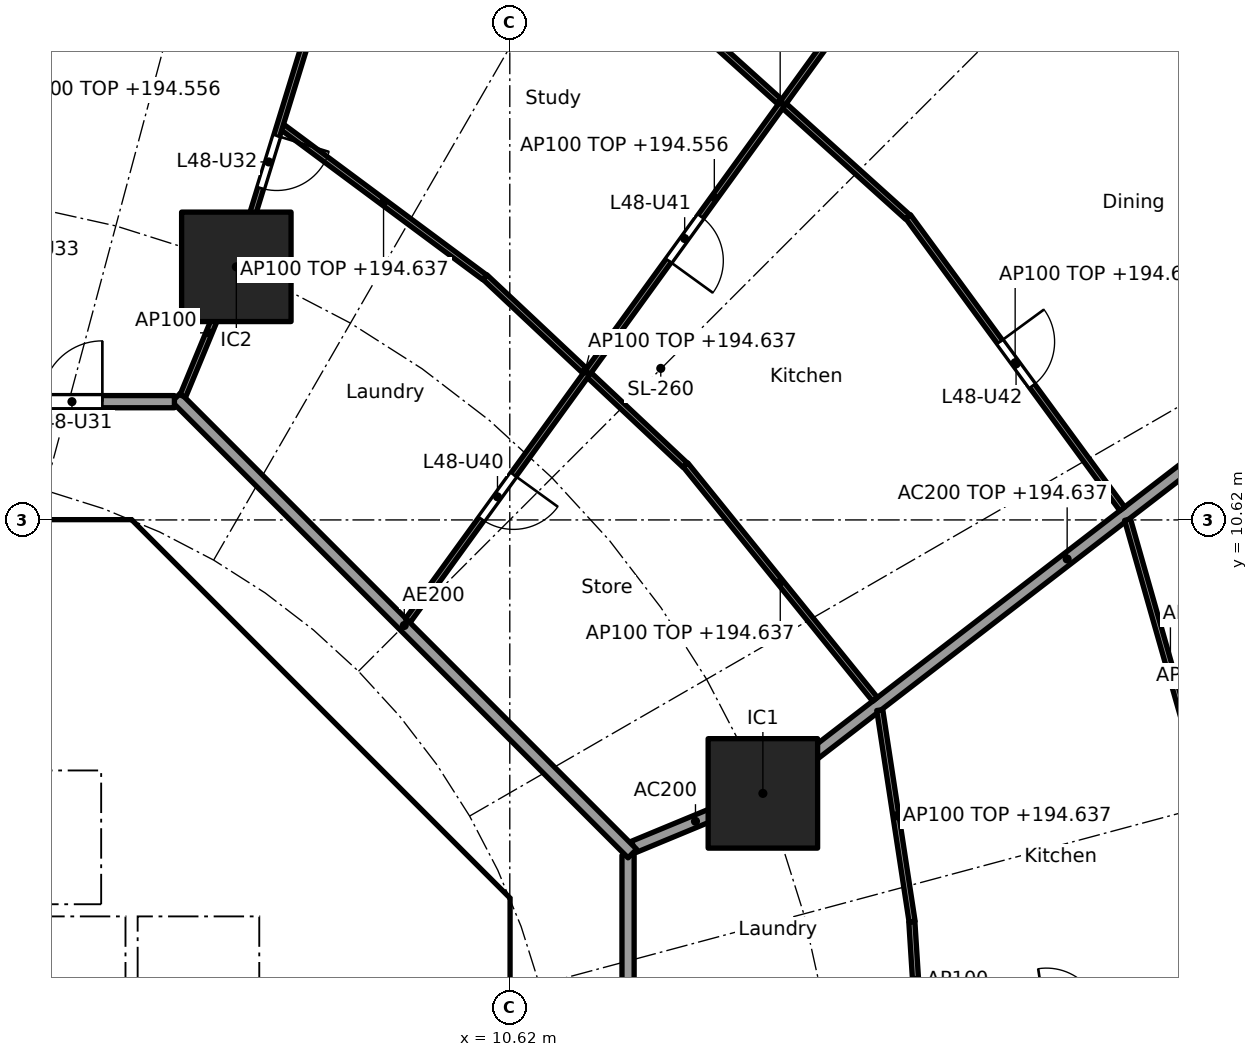
"""IFC4 building model, lengths in metres.
Left out: names, types, materials, properties, quantities, classifications, styles, units other than length and angle.
Written with IfcOpenShell. Run it as: python <this file> out.ifc"""

import sys

from ifc_helpers import new_model, si_unit, direction, frame, frame_2d, origin, origin_2d, place, context, subcontext, project, spatial, polyline, rectangle, outline, extrude, element, fill, save


model = new_model("IFC4")
c1 = context("Model", 3, precision=1e-05, world=origin(), true_north=direction((0.0, 1.0)))
c2 = subcontext(c1, "Body", "Model", "MODEL_VIEW")
j1 = project(units=[si_unit("LENGTHUNIT", "METRE"), si_unit("PLANEANGLEUNIT", "RADIAN")], contexts=[c1])
p1 = place(None, origin())
s1 = spatial("IfcSite", under=j1, at=p1, CompositionType="ELEMENT")
p2 = place(p1, origin())
s2 = spatial("IfcBuilding", under=s1, at=p2, CompositionType="ELEMENT")
p3 = place(p2, frame((0.0, 0.0, 191.8)))
s3 = spatial("IfcBuildingStorey", under=s2, at=p3, CompositionType="ELEMENT", Elevation=191.8)
for number, where, z_axis, x_axis in (
    (1, (14.782, 6.123, 0.0), (0.0, 0.0, 1.0), (1.0, 0.0, 0.0)),
    (2, (6.123, 14.782, 0.0), (0.0, 0.0, 1.0), (1.0, 0.0, 0.0)),
):
    element("IfcColumn", number, at=place(p3, frame(where, z_axis=z_axis, x_axis=x_axis)), inside=s3, PredefinedType="COLUMN", context=c2, shape_type="SweptSolid", body=[
        extrude(rectangle(XDim=1.8, YDim=1.8, at=origin_2d()), origin(), (0.0, 0.0, 1.0), 3.7),
    ])
p4 = place(p3, frame((9.988, 4.613, 0.0), z_axis=(0.0, 0.0, 1.0), x_axis=(-0.707106781187, 0.707106781187, 0.0)))
e3 = element("IfcWall", 3, at=p4, inside=s3, PredefinedType="SHEAR", context=c2, shape_type="SweptSolid", body=[
    extrude(rectangle(XDim=7.602, YDim=0.6, at=frame_2d((3.801, 0.0))), origin(), (0.0, 0.0, 1.0), 3.44),
])
p5 = place(p4, frame((3.201, 0.0, 0.0)))
e4 = element("IfcOpeningElement", 4, at=p5, cuts=e3, PredefinedType="OPENING", context=c2, shape_type="SweptSolid", body=[
    extrude(rectangle(XDim=1.2, YDim=2.1, at=frame_2d((0.6, 1.05))), frame((0.0, 0.31, 0.0), z_axis=(0.0, -1.0, 0.0), x_axis=(1.0, 0.0, 0.0)), (0.0, 0.0, 1.0), 0.62),
])
p6 = place(p3, frame((4.0, 4.3, 0.0), z_axis=(0.0, 0.0, 1.0), x_axis=(0.0, 1.0, 0.0)))
e5 = element("IfcWall", 5, at=p6, inside=s3, PredefinedType="SOLIDWALL", context=c2, shape_type="SweptSolid", body=[
    extrude(rectangle(XDim=2.2, YDim=0.2, at=frame_2d((1.1, 0.0))), origin(), (0.0, 0.0, 1.0), 3.44),
])
p7 = place(p6, frame((0.55, 0.0, 0.0)))
e6 = element("IfcOpeningElement", 6, at=p7, cuts=e5, PredefinedType="OPENING", context=c2, shape_type="SweptSolid", body=[
    extrude(rectangle(XDim=1.1, YDim=2.1, at=frame_2d((0.55, 1.05))), frame((0.0, 0.11, 0.0), z_axis=(0.0, -1.0, 0.0), x_axis=(1.0, 0.0, 0.0)), (0.0, 0.0, 1.0), 0.22),
])
p8 = place(p3, frame((6.7, 4.0, 0.0), z_axis=(0.0, 0.0, 1.0), x_axis=(1.0, 0.0, 0.0)))
e7 = element("IfcWall", 7, at=p8, inside=s3, PredefinedType="SOLIDWALL", context=c2, shape_type="SweptSolid", body=[
    extrude(rectangle(XDim=3.325, YDim=0.2, at=frame_2d((1.662, 0.0))), origin(), (0.0, 0.0, 1.0), 3.44),
])
p9 = place(p8, frame((1.25, 0.0, 0.0)))
e8 = element("IfcOpeningElement", 8, at=p9, cuts=e7, PredefinedType="OPENING", context=c2, shape_type="SweptSolid", body=[
    extrude(rectangle(XDim=1.1, YDim=2.1, at=frame_2d((0.55, 1.05))), frame((0.0, 0.11, 0.0), z_axis=(0.0, -1.0, 0.0), x_axis=(1.0, 0.0, 0.0)), (0.0, 0.0, 1.0), 0.22),
])
p10 = place(p3, frame((4.0, 7.025, 0.0), z_axis=(0.0, 0.0, 1.0), x_axis=(0.0, 1.0, 0.0)))
e9 = element("IfcWall", 9, at=p10, inside=s3, PredefinedType="SOLIDWALL", context=c2, shape_type="SweptSolid", body=[
    extrude(rectangle(XDim=3.0, YDim=0.2, at=frame_2d((1.5, 0.0))), origin(), (0.0, 0.0, 1.0), 3.44),
])
p11 = place(p10, frame((0.925, 0.0, 0.0)))
e10 = element("IfcOpeningElement", 10, at=p11, cuts=e9, PredefinedType="OPENING", context=c2, shape_type="SweptSolid", body=[
    extrude(rectangle(XDim=1.1, YDim=2.1, at=frame_2d((0.55, 1.05))), frame((0.0, 0.11, 0.0), z_axis=(0.0, -1.0, 0.0), x_axis=(1.0, 0.0, 0.0)), (0.0, 0.0, 1.0), 0.22),
])
p12 = place(p3, origin())
e11 = element("IfcWall", 11, at=p12, inside=s3, PredefinedType="SHEAR", context=c2, shape_type="SweptSolid", body=[
    extrude(outline(polyline([(-4.152, 10.025), (-4.401, 9.776), (-4.825, 10.2), (-4.401, 10.625), (4.401, 10.625), (4.825, 10.2), (4.401, 9.776), (4.152, 10.025), (-4.152, 10.025)])), origin(), (0.0, 0.0, 1.0), 3.44),
])
p13 = place(p3, origin())
e12 = element("IfcWall", 12, at=p13, inside=s3, PredefinedType="SHEAR", context=c2, shape_type="SweptSolid", body=[
    extrude(outline(polyline([(9.776, -4.401), (10.025, -4.152), (10.025, -3.801), (10.025, 4.152), (9.776, 4.401), (10.2, 4.825), (10.625, 4.401), (10.625, -4.401), (10.2, -4.825), (9.776, -4.401)])), origin(), (0.0, 0.0, 1.0), 3.44),
])
p14 = place(p3, origin())
e13 = element("IfcWall", 13, at=p14, inside=s3, PredefinedType="SOLIDWALL", context=c2, shape_type="SweptSolid", body=[
    extrude(outline(polyline([(-6.7, 4.3), (6.7, 4.3), (6.7, 2.1), (6.5, 2.1), (6.5, 4.1), (4.5, 4.1), (4.5, 2.1), (4.3, 2.1), (4.3, 4.1), (2.3, 4.1), (2.3, 2.1), (2.1, 2.1), (2.1, 4.1), (0.1, 4.1), (0.1, 2.1), (-0.1, 2.1), (-0.1, 4.1), (-2.1, 4.1), (-2.1, 2.1), (-2.3, 2.1), (-2.3, 4.1), (-6.5, 4.1), (-6.5, 2.1), (-6.7, 2.1), (-6.7, 4.3)])), origin(), (0.0, 0.0, 1.0), 3.44),
])
p15 = place(p3, origin())
e14 = element("IfcWall", 14, at=p15, inside=s3, PredefinedType="SOLIDWALL", context=c2, shape_type="SweptSolid", body=[
    extrude(outline(polyline([(4.1, 6.5), (-4.1, 6.5), (-4.1, 7.025), (4.1, 7.025), (4.1, 6.5)])), origin(), (0.0, 0.0, 1.0), 3.44),
])
p16 = place(p3, origin())
e15 = element("IfcWall", 15, at=p16, inside=s3, PredefinedType="SOLIDWALL", context=c2, shape_type="SweptSolid", body=[
    extrude(outline(polyline([(7.025, -3.9), (6.7, -3.9), (6.7, 3.9), (7.025, 3.9), (7.025, -3.9)])), origin(), (0.0, 0.0, 1.0), 3.44),
])
p17 = place(p3, frame((12.657, 5.243, 0.0), z_axis=(0.0, 0.0, 1.0), x_axis=(0.92383017907, 0.382802560388, 0.0)))
e16 = element("IfcWall", 16, at=p17, inside=s3, PredefinedType="PARTITIONING", context=c2, shape_type="SweptSolid", body=[
    extrude(rectangle(XDim=2.2, YDim=0.2, at=frame_2d((1.1, 0.0))), origin(), (0.0, 0.0, 1.0), 3.44),
])
p18 = place(p3, frame((14.822, 6.154, 0.0), z_axis=(0.0, 0.0, 1.0), x_axis=(0.792203056092, 0.610257583254, 0.0)))
e17 = element("IfcWall", 17, at=p18, inside=s3, PredefinedType="PARTITIONING", context=c2, shape_type="SweptSolid", body=[
    extrude(rectangle(XDim=12.533, YDim=0.2, at=frame_2d((6.266, 0.0))), origin(), (0.0, 0.0, 1.0), 2.837),
])
p19 = place(p3, frame((12.565, -5.104, 0.0), z_axis=(0.0, 0.0, 1.0), x_axis=(0.0, 1.0, 0.0)))
e18 = element("IfcWall", 18, at=p19, inside=s3, PredefinedType="PARTITIONING", context=c2, shape_type="SweptSolid", body=[
    extrude(rectangle(XDim=10.209, YDim=0.2, at=frame_2d((5.104, 0.0))), origin(), (0.0, 0.0, 1.0), 3.44),
])
p20 = place(p19, frame((4.604, 0.0, 0.0)))
e19 = element("IfcOpeningElement", 19, at=p20, cuts=e18, PredefinedType="OPENING", context=c2, shape_type="SweptSolid", body=[
    extrude(rectangle(XDim=1.0, YDim=2.1, at=frame_2d((0.5, 1.05))), frame((0.0, 0.11, 0.0), z_axis=(0.0, -1.0, 0.0), x_axis=(1.0, 0.0, 0.0)), (0.0, 0.0, 1.0), 0.22),
])
p21 = place(p3, frame((12.635, 5.134, 0.0), z_axis=(0.0, 0.0, 1.0), x_axis=(-0.707106781187, 0.707106781187, 0.0)))
e20 = element("IfcWall", 20, at=p21, inside=s3, PredefinedType="PARTITIONING", context=c2, shape_type="SweptSolid", body=[
    extrude(rectangle(XDim=10.609, YDim=0.2, at=frame_2d((5.305, 0.0))), origin(), (0.0, 0.0, 1.0), 3.44),
])
p22 = place(p3, frame((5.104, 12.565, 0.0), z_axis=(0.0, 0.0, 1.0), x_axis=(-1.0, 0.0, 0.0)))
e21 = element("IfcWall", 21, at=p22, inside=s3, PredefinedType="PARTITIONING", context=c2, shape_type="SweptSolid", body=[
    extrude(rectangle(XDim=10.409, YDim=0.2, at=frame_2d((5.205, 0.0))), origin(), (0.0, 0.0, 1.0), 3.44),
])
p23 = place(p22, frame((1.185, 0.0, 0.0)))
e22 = element("IfcOpeningElement", 22, at=p23, cuts=e21, PredefinedType="OPENING", context=c2, shape_type="SweptSolid", body=[
    extrude(rectangle(XDim=1.0, YDim=2.1, at=frame_2d((0.5, 1.05))), frame((0.0, 0.11, 0.0), z_axis=(0.0, -1.0, 0.0), x_axis=(1.0, 0.0, 0.0)), (0.0, 0.0, 1.0), 0.22),
])
p24 = place(p3, frame((17.355, 2.082, 0.0), z_axis=(0.0, 0.0, 1.0), x_axis=(-0.063689464349, 0.997969765139, 0.0)))
e23 = element("IfcWall", 23, at=p24, inside=s3, PredefinedType="PARTITIONING", context=c2, shape_type="SweptSolid", body=[
    extrude(rectangle(XDim=1.936, YDim=0.1, at=frame_2d((0.968, 0.0))), origin(), (0.0, 0.0, 1.0), 3.44),
])
p25 = place(p3, frame((17.236, 4.014, 0.0), z_axis=(0.0, 0.0, 1.0), x_axis=(-0.151087537093, 0.988520387314, 0.0)))
e24 = element("IfcWall", 24, at=p25, inside=s3, PredefinedType="PARTITIONING", context=c2, shape_type="SweptSolid", body=[
    extrude(rectangle(XDim=3.519, YDim=0.1, at=frame_2d((1.76, 0.0))), origin(), (0.0, 0.0, 1.0), 2.837),
])
p26 = place(p3, frame((22.189, 5.67, 0.0), z_axis=(0.0, 0.0, 1.0), x_axis=(-0.273819702124, 0.961781040949, 0.0)))
e25 = element("IfcWall", 25, at=p26, inside=s3, PredefinedType="PARTITIONING", context=c2, shape_type="SweptSolid", body=[
    extrude(rectangle(XDim=5.152, YDim=0.1, at=frame_2d((2.576, 0.0))), origin(), (0.0, 0.0, 1.0), 2.837),
])
p27 = place(p3, frame((16.626, 7.67, 0.0), z_axis=(0.0, 0.0, 1.0), x_axis=(-0.628764602857, 0.777595700987, 0.0)))
e26 = element("IfcWall", 26, at=p27, inside=s3, PredefinedType="PARTITIONING", context=c2, shape_type="SweptSolid", body=[
    extrude(rectangle(XDim=4.957, YDim=0.1, at=frame_2d((2.479, 0.0))), origin(), (0.0, 0.0, 1.0), 2.837),
])
p28 = place(p3, frame((20.692, 10.802, 0.0), z_axis=(0.0, 0.0, 1.0), x_axis=(-0.591122127251, 0.806582066918, 0.0)))
e27 = element("IfcWall", 27, at=p28, inside=s3, PredefinedType="PARTITIONING", context=c2, shape_type="SweptSolid", body=[
    extrude(rectangle(XDim=5.96, YDim=0.1, at=frame_2d((2.98, 0.0))), origin(), (0.0, 0.0, 1.0), 2.837),
])
p29 = place(p28, frame((2.505, 0.0, 0.0)))
e28 = element("IfcOpeningElement", 28, at=p29, cuts=e27, PredefinedType="OPENING", context=c2, shape_type="SweptSolid", body=[
    extrude(rectangle(XDim=0.9, YDim=2.1, at=frame_2d((0.45, 1.05))), frame((0.0, 0.06, 0.0), z_axis=(0.0, -1.0, 0.0), x_axis=(1.0, 0.0, 0.0)), (0.0, 0.0, 1.0), 0.12),
])
p30 = place(p3, frame((13.504, 11.52, 0.0), z_axis=(0.0, 0.0, 1.0), x_axis=(-0.728883199496, 0.684638066055, 0.0)))
e29 = element("IfcWall", 29, at=p30, inside=s3, PredefinedType="PARTITIONING", context=c2, shape_type="SweptSolid", body=[
    extrude(rectangle(XDim=4.519, YDim=0.1, at=frame_2d((2.26, 0.0))), origin(), (0.0, 0.0, 1.0), 2.837),
])
p31 = place(p3, frame((17.162, 15.603, 0.0), z_axis=(0.0, 0.0, 1.0), x_axis=(-0.742768881471, 0.669547898748, 0.0)))
e30 = element("IfcWall", 30, at=p31, inside=s3, PredefinedType="PARTITIONING", context=c2, shape_type="SweptSolid", body=[
    extrude(rectangle(XDim=5.642, YDim=0.1, at=frame_2d((2.821, 0.0))), origin(), (0.0, 0.0, 1.0), 2.837),
])
p32 = place(p3, frame((8.943, 8.966, 0.0), z_axis=(0.0, 0.0, 1.0), x_axis=(0.586803608919, 0.809729290912, 0.0)))
e31 = element("IfcWall", 31, at=p32, inside=s3, PredefinedType="PARTITIONING", context=c2, shape_type="SweptSolid", body=[
    extrude(rectangle(XDim=17.179, YDim=0.1, at=frame_2d((8.589, 0.0))), origin(), (0.0, 0.0, 1.0), 2.756),
])
p33 = place(p32, frame((2.062, 0.0, 0.0)))
e32 = element("IfcOpeningElement", 32, at=p33, cuts=e31, PredefinedType="OPENING", context=c2, shape_type="SweptSolid", body=[
    extrude(rectangle(XDim=0.9, YDim=2.1, at=frame_2d((0.45, 1.05))), frame((0.0, 0.06, 0.0), z_axis=(0.0, -1.0, 0.0), x_axis=(1.0, 0.0, 0.0)), (0.0, 0.0, 1.0), 0.12),
])
p34 = place(p32, frame((7.308, 0.0, 0.0)))
e33 = element("IfcOpeningElement", 33, at=p34, cuts=e31, PredefinedType="OPENING", context=c2, shape_type="SweptSolid", body=[
    extrude(rectangle(XDim=0.9, YDim=2.1, at=frame_2d((0.45, 1.05))), frame((0.0, 0.06, 0.0), z_axis=(0.0, -1.0, 0.0), x_axis=(1.0, 0.0, 0.0)), (0.0, 0.0, 1.0), 0.12),
])
p35 = place(p3, frame((10.207, 14.61, 0.0), z_axis=(0.0, 0.0, 1.0), x_axis=(-0.802784956441, 0.596268659005, 0.0)))
e34 = element("IfcWall", 34, at=p35, inside=s3, PredefinedType="PARTITIONING", context=c2, shape_type="SweptSolid", body=[
    extrude(rectangle(XDim=4.142, YDim=0.1, at=frame_2d((2.071, 0.0))), origin(), (0.0, 0.0, 1.0), 2.837),
])
p36 = place(p3, frame((5.243, 12.657, 0.0), z_axis=(0.0, 0.0, 1.0), x_axis=(0.382719158442, 0.923864733477, 0.0)))
e35 = element("IfcWall", 35, at=p36, inside=s3, PredefinedType="PARTITIONING", context=c2, shape_type="SweptSolid", body=[
    extrude(rectangle(XDim=2.25, YDim=0.1, at=frame_2d((1.125, 0.0))), origin(), (0.0, 0.0, 1.0), 3.44),
])
p37 = place(p3, frame((6.138, 14.83, 0.0), z_axis=(0.0, 0.0, 1.0), x_axis=(0.294818517221, 0.955553264818, 0.0)))
e36 = element("IfcWall", 36, at=p37, inside=s3, PredefinedType="PARTITIONING", context=c2, shape_type="SweptSolid", body=[
    extrude(rectangle(XDim=12.619, YDim=0.1, at=frame_2d((6.31, 0.0))), origin(), (0.0, 0.0, 1.0), 2.837),
])
p38 = place(p37, frame((1.306, 0.0, 0.0)))
e37 = element("IfcOpeningElement", 37, at=p38, cuts=e36, PredefinedType="OPENING", context=c2, shape_type="SweptSolid", body=[
    extrude(rectangle(XDim=0.9, YDim=2.1, at=frame_2d((0.45, 1.05))), frame((0.0, 0.06, 0.0), z_axis=(0.0, -1.0, 0.0), x_axis=(1.0, 0.0, 0.0)), (0.0, 0.0, 1.0), 0.12),
])
p39 = place(p37, frame((4.515, 0.0, 0.0)))
e38 = element("IfcOpeningElement", 38, at=p39, cuts=e36, PredefinedType="OPENING", context=c2, shape_type="SweptSolid", body=[
    extrude(rectangle(XDim=0.9, YDim=2.1, at=frame_2d((0.45, 1.05))), frame((0.0, 0.06, 0.0), z_axis=(0.0, -1.0, 0.0), x_axis=(1.0, 0.0, 0.0)), (0.0, 0.0, 1.0), 0.12),
])
p40 = place(p7, origin())
e39 = element("IfcDoor", 39, at=p40, inside=s3, OperationType="DOUBLE_DOOR_SLIDING", PredefinedType="DOOR", context=c2, shape_type="SweptSolid", body=[
    extrude(rectangle(XDim=1.1, YDim=2.1, at=frame_2d((0.55, 1.05))), frame((0.0, 0.025, 0.0), z_axis=(0.0, -1.0, 0.0), x_axis=(1.0, 0.0, 0.0)), (0.0, 0.0, 1.0), 0.05),
])
fill(e6, e39)
p41 = place(p9, frame((1.1, 0.0, 0.0), x_axis=(-1.0, 0.0, 0.0)))
e40 = element("IfcDoor", 40, at=p41, inside=s3, OperationType="SINGLE_SWING_RIGHT", PredefinedType="DOOR", context=c2, shape_type="SweptSolid", body=[
    extrude(rectangle(XDim=1.1, YDim=2.1, at=frame_2d((0.55, 1.05))), frame((0.0, 0.025, 0.0), z_axis=(0.0, -1.0, 0.0), x_axis=(1.0, 0.0, 0.0)), (0.0, 0.0, 1.0), 0.05),
])
fill(e8, e40)
p42 = place(p11, origin())
e41 = element("IfcDoor", 41, at=p42, inside=s3, OperationType="SINGLE_SWING_LEFT", PredefinedType="DOOR", context=c2, shape_type="SweptSolid", body=[
    extrude(rectangle(XDim=1.1, YDim=2.1, at=frame_2d((0.55, 1.05))), frame((0.0, 0.025, 0.0), z_axis=(0.0, -1.0, 0.0), x_axis=(1.0, 0.0, 0.0)), (0.0, 0.0, 1.0), 0.05),
])
fill(e10, e41)
p43 = place(p5, origin())
e42 = element("IfcDoor", 42, at=p43, inside=s3, OperationType="SINGLE_SWING_RIGHT", PredefinedType="DOOR", context=c2, shape_type="SweptSolid", body=[
    extrude(rectangle(XDim=1.2, YDim=2.1, at=frame_2d((0.6, 1.05))), frame((0.0, 0.025, 0.0), z_axis=(0.0, -1.0, 0.0), x_axis=(1.0, 0.0, 0.0)), (0.0, 0.0, 1.0), 0.05),
])
fill(e4, e42)
p44 = place(p23, frame((1.0, 0.0, 0.0), x_axis=(-1.0, 0.0, 0.0)))
e43 = element("IfcDoor", 43, at=p44, inside=s3, OperationType="SINGLE_SWING_RIGHT", PredefinedType="DOOR", context=c2, shape_type="SweptSolid", body=[
    extrude(rectangle(XDim=1.0, YDim=2.1, at=frame_2d((0.5, 1.05))), frame((0.0, 0.025, 0.0), z_axis=(0.0, -1.0, 0.0), x_axis=(1.0, 0.0, 0.0)), (0.0, 0.0, 1.0), 0.05),
])
fill(e22, e43)
p45 = place(p38, frame((0.9, 0.0, 0.0), x_axis=(-1.0, 0.0, 0.0)))
e44 = element("IfcDoor", 44, at=p45, inside=s3, OperationType="SINGLE_SWING_LEFT", PredefinedType="DOOR", context=c2, shape_type="SweptSolid", body=[
    extrude(rectangle(XDim=0.9, YDim=2.1, at=frame_2d((0.45, 1.05))), frame((0.0, 0.025, 0.0), z_axis=(0.0, -1.0, 0.0), x_axis=(1.0, 0.0, 0.0)), (0.0, 0.0, 1.0), 0.05),
])
fill(e37, e44)
p46 = place(p33, frame((0.9, 0.0, 0.0), x_axis=(-1.0, 0.0, 0.0)))
e45 = element("IfcDoor", 45, at=p46, inside=s3, OperationType="SINGLE_SWING_LEFT", PredefinedType="DOOR", context=c2, shape_type="SweptSolid", body=[
    extrude(rectangle(XDim=0.9, YDim=2.1, at=frame_2d((0.45, 1.05))), frame((0.0, 0.025, 0.0), z_axis=(0.0, -1.0, 0.0), x_axis=(1.0, 0.0, 0.0)), (0.0, 0.0, 1.0), 0.05),
])
fill(e32, e45)
p47 = place(p34, frame((0.9, 0.0, 0.0), x_axis=(-1.0, 0.0, 0.0)))
e46 = element("IfcDoor", 46, at=p47, inside=s3, OperationType="SINGLE_SWING_RIGHT", PredefinedType="DOOR", context=c2, shape_type="SweptSolid", body=[
    extrude(rectangle(XDim=0.9, YDim=2.1, at=frame_2d((0.45, 1.05))), frame((0.0, 0.025, 0.0), z_axis=(0.0, -1.0, 0.0), x_axis=(1.0, 0.0, 0.0)), (0.0, 0.0, 1.0), 0.05),
])
fill(e33, e46)
p48 = place(p29, frame((0.9, 0.0, 0.0), x_axis=(-1.0, 0.0, 0.0)))
e47 = element("IfcDoor", 47, at=p48, inside=s3, OperationType="SINGLE_SWING_LEFT", PredefinedType="DOOR", context=c2, shape_type="SweptSolid", body=[
    extrude(rectangle(XDim=0.9, YDim=2.1, at=frame_2d((0.45, 1.05))), frame((0.0, 0.025, 0.0), z_axis=(0.0, -1.0, 0.0), x_axis=(1.0, 0.0, 0.0)), (0.0, 0.0, 1.0), 0.05),
])
fill(e28, e47)
save(model, sys.argv[1])
